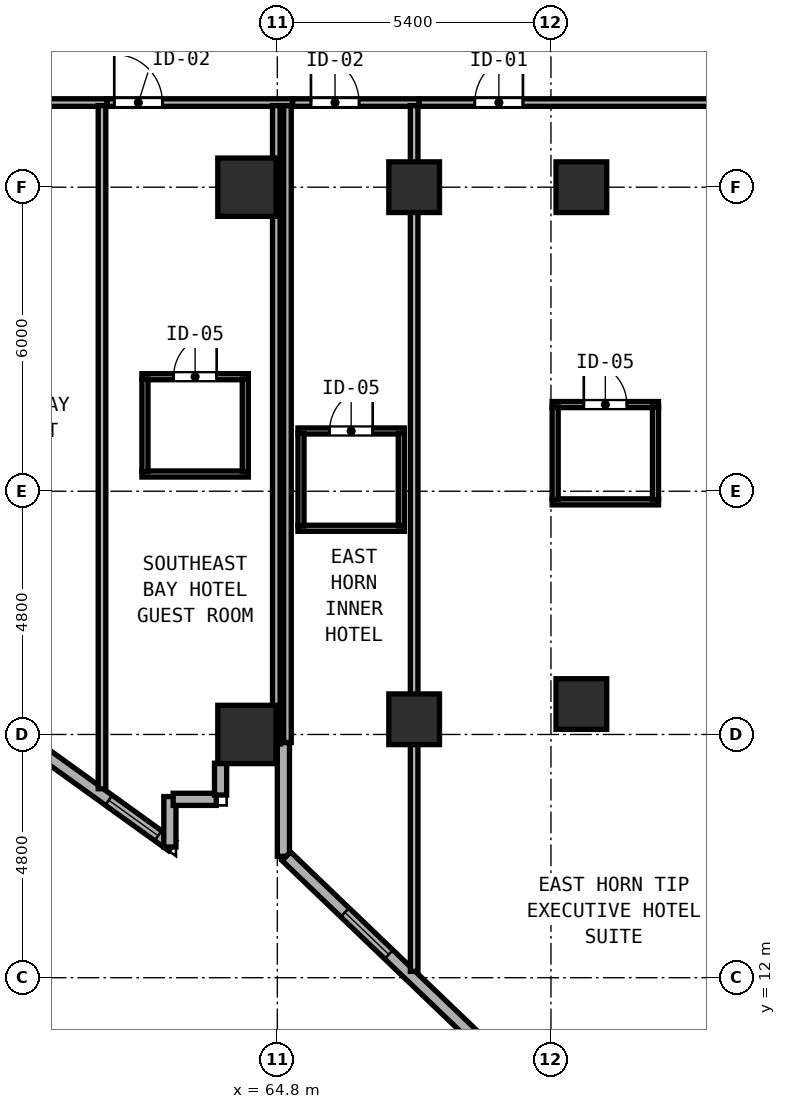
"""IFC4 building model, lengths in metres.
Left out: names, types, materials, properties, quantities, classifications, styles, units other than length and angle.
Written with IfcOpenShell. Run it as: python <this file> out.ifc"""

import sys

from ifc_helpers import new_model, si_unit, direction, frame, frame_2d, origin, origin_2d, place, context, subcontext, project, spatial, rectangle, hollow_rectangle, extrude, element, fill, save


model = new_model("IFC4")
c1 = context("Model", 3, precision=1e-05, world=origin(), true_north=direction((0.0, 1.0)))
c2 = subcontext(c1, "Body", "Model", "MODEL_VIEW")
j1 = project(units=[si_unit("LENGTHUNIT", "METRE"), si_unit("PLANEANGLEUNIT", "RADIAN")], contexts=[c1])
p1 = place(None, origin())
s1 = spatial("IfcSite", under=j1, at=p1, CompositionType="ELEMENT")
p2 = place(p1, origin())
s2 = spatial("IfcBuilding", under=s1, at=p2, CompositionType="ELEMENT")
p3 = place(p2, frame((0.0, 0.0, 55.2)))
s3 = spatial("IfcBuildingStorey", under=s2, at=p3, CompositionType="ELEMENT", Elevation=55.2)
for number, where, z_axis, x_axis in (
    (1, (64.2, 16.8, 0.0), (0.0, 0.0, 1.0), (1.0, 0.0, 0.0)),
    (2, (64.2, 27.6, 0.0), (0.0, 0.0, 1.0), (1.0, 0.0, 0.0)),
):
    element("IfcColumn", number, at=place(p3, frame(where, z_axis=z_axis, x_axis=x_axis)), inside=s3, PredefinedType="COLUMN", context=c2, shape_type="SweptSolid", body=[
        extrude(hollow_rectangle(XDim=1.15, YDim=1.15, WallThickness=0.042, at=origin_2d()), origin(), (0.0, 0.0, 1.0), 3.8),
    ])
for number, where, z_axis, x_axis in (
    (3, (70.8, 17.4, 0.0), (0.0, 0.0, 1.0), (1.0, 0.0, 0.0)),
    (4, (70.8, 27.6, 0.0), (0.0, 0.0, 1.0), (1.0, 0.0, 0.0)),
    (5, (67.5, 17.1, 0.0), (0.0, 0.0, 1.0), (1.0, 0.0, 0.0)),
    (6, (67.5, 27.6, 0.0), (0.0, 0.0, 1.0), (1.0, 0.0, 0.0)),
):
    element("IfcColumn", number, at=place(p3, frame(where, z_axis=z_axis, x_axis=x_axis)), inside=s3, PredefinedType="COLUMN", context=c2, shape_type="SweptSolid", body=[
        extrude(hollow_rectangle(XDim=1.0, YDim=1.0, WallThickness=0.038, at=origin_2d()), origin(), (0.0, 0.0, 1.0), 3.8),
    ])
p4 = place(p3, frame((53.367, 21.34, 0.0), z_axis=(0.0, 0.0, 1.0), x_axis=(0.811543176492, -0.58429245476, 0.0)))
e7 = element("IfcWall", 7, at=p4, inside=s3, PredefinedType="SOLIDWALL", context=c2, shape_type="SweptSolid", body=[
    extrude(rectangle(XDim=11.531, YDim=0.24, at=frame_2d((5.765, 0.0))), origin(), (0.0, 0.0, 1.0), 3.097),
])
p5 = place(p4, frame((1.6, 0.0, 0.85)))
e8 = element("IfcOpeningElement", 8, at=p5, cuts=e7, PredefinedType="OPENING", context=c2, shape_type="SweptSolid", body=[
    extrude(rectangle(XDim=1.2, YDim=1.85, at=frame_2d((0.6, 0.925))), frame((0.0, 0.13, 0.0), z_axis=(0.0, -1.0, 0.0), x_axis=(1.0, 0.0, 0.0)), (0.0, 0.0, 1.0), 0.26),
])
p6 = place(p4, frame((7.0, 0.0, 0.85)))
e9 = element("IfcOpeningElement", 9, at=p6, cuts=e7, PredefinedType="OPENING", context=c2, shape_type="SweptSolid", body=[
    extrude(rectangle(XDim=1.2, YDim=1.85, at=frame_2d((0.6, 0.925))), frame((0.0, 0.13, 0.0), z_axis=(0.0, -1.0, 0.0), x_axis=(1.0, 0.0, 0.0)), (0.0, 0.0, 1.0), 0.26),
])
p7 = place(p4, frame((9.99, 0.0, 0.85)))
e10 = element("IfcOpeningElement", 10, at=p7, cuts=e7, PredefinedType="OPENING", context=c2, shape_type="SweptSolid", body=[
    extrude(rectangle(XDim=1.2, YDim=1.85, at=frame_2d((0.6, 0.925))), frame((0.0, 0.13, 0.0), z_axis=(0.0, -1.0, 0.0), x_axis=(1.0, 0.0, 0.0)), (0.0, 0.0, 1.0), 0.26),
])
p8 = place(p3, frame((62.68, 14.579, 0.0), z_axis=(0.0, 0.0, 1.0), x_axis=(0.0, 1.0, 0.0)))
e11 = element("IfcWall", 11, at=p8, inside=s3, PredefinedType="SOLIDWALL", context=c2, shape_type="SweptSolid", body=[
    extrude(rectangle(XDim=0.996, YDim=0.24, at=frame_2d((0.498, 0.0))), origin(), (0.0, 0.0, 1.0), 3.6),
])
p9 = place(p3, frame((62.745, 15.52, 0.0), z_axis=(0.0, 0.0, 1.0), x_axis=(1.0, 0.0, 0.0)))
e12 = element("IfcWall", 12, at=p9, inside=s3, PredefinedType="SOLIDWALL", context=c2, shape_type="SweptSolid", body=[
    extrude(rectangle(XDim=0.85, YDim=0.24, at=frame_2d((0.425, 0.0))), origin(), (0.0, 0.0, 1.0), 3.6),
])
p10 = place(p3, frame((63.68, 15.605, 0.0), z_axis=(0.0, 0.0, 1.0), x_axis=(0.0, 1.0, 0.0)))
e13 = element("IfcWall", 13, at=p10, inside=s3, PredefinedType="SOLIDWALL", context=c2, shape_type="SweptSolid", body=[
    extrude(rectangle(XDim=0.628, YDim=0.24, at=frame_2d((0.314, 0.0))), origin(), (0.0, 0.0, 1.0), 3.6),
])
p11 = place(p3, frame((64.92, 16.64, 0.0), z_axis=(0.0, 0.0, 1.0), x_axis=(0.0, -1.0, 0.0)))
e14 = element("IfcWall", 14, at=p11, inside=s3, PredefinedType="SOLIDWALL", context=c2, shape_type="SweptSolid", body=[
    extrude(rectangle(XDim=2.244, YDim=0.24, at=frame_2d((1.122, 0.0))), origin(), (0.0, 0.0, 1.0), 3.6),
])
p12 = place(p3, frame((64.978, 14.396, 0.0), z_axis=(0.0, 0.0, 1.0), x_axis=(0.722045918727, -0.691845135308, 0.0)))
e15 = element("IfcWall", 15, at=p12, inside=s3, PredefinedType="SOLIDWALL", context=c2, shape_type="SweptSolid", body=[
    extrude(rectangle(XDim=11.358, YDim=0.24, at=frame_2d((5.679, 0.0))), origin(), (0.0, 0.0, 1.0), 3.6),
])
p13 = place(p12, frame((1.6, 0.0, 0.85)))
e16 = element("IfcOpeningElement", 16, at=p13, cuts=e15, PredefinedType="OPENING", context=c2, shape_type="SweptSolid", body=[
    extrude(rectangle(XDim=1.2, YDim=1.85, at=frame_2d((0.6, 0.925))), frame((0.0, 0.13, 0.0), z_axis=(0.0, -1.0, 0.0), x_axis=(1.0, 0.0, 0.0)), (0.0, 0.0, 1.0), 0.26),
])
p14 = place(p12, frame((7.0, 0.0, 0.85)))
e17 = element("IfcOpeningElement", 17, at=p14, cuts=e15, PredefinedType="OPENING", context=c2, shape_type="SweptSolid", body=[
    extrude(rectangle(XDim=1.2, YDim=1.85, at=frame_2d((0.6, 0.925))), frame((0.0, 0.13, 0.0), z_axis=(0.0, -1.0, 0.0), x_axis=(1.0, 0.0, 0.0)), (0.0, 0.0, 1.0), 0.26),
])
p15 = place(p3, frame((75.077, 28.713, 0.0), z_axis=(0.0, 0.0, 1.0), x_axis=(-0.675751546976, 0.737129464042, 0.0)))
e18 = element("IfcWall", 18, at=p15, inside=s3, PredefinedType="SOLIDWALL", context=c2, shape_type="SweptSolid", body=[
    extrude(rectangle(XDim=3.286, YDim=0.24, at=frame_2d((1.643, 0.0))), origin(), (0.0, 0.0, 1.0), 3.6),
])
p16 = place(p3, frame((57.172, 29.27, 0.0), z_axis=(0.0, 0.0, 1.0), x_axis=(1.0, 0.0, 0.0)))
e19 = element("IfcWall", 19, at=p16, inside=s3, PredefinedType="PARTITIONING", context=c2, shape_type="SweptSolid", body=[
    extrude(rectangle(XDim=4.268, YDim=0.15, at=frame_2d((2.134, 0.0))), origin(), (0.0, 0.0, 1.0), 3.6),
])
p17 = place(p16, frame((2.959, 0.0, 0.0), z_axis=(0.0, 0.0, 1.0), x_axis=(-1.0, 0.0, 0.0)))
e20 = element("IfcOpeningElement", 20, at=p17, cuts=e19, PredefinedType="OPENING", context=c2, shape_type="SweptSolid", body=[
    extrude(rectangle(XDim=0.95, YDim=2.15, at=frame_2d((0.475, 1.075))), frame((0.0, 0.085, 0.0), z_axis=(0.0, -1.0, 0.0), x_axis=(1.0, 0.0, 0.0)), (0.0, 0.0, 1.0), 0.17),
])
p18 = place(p3, frame((61.34, 15.729, 0.0), z_axis=(0.0, 0.0, 1.0), x_axis=(0.0, 1.0, 0.0)))
e21 = element("IfcWall", 21, at=p18, inside=s3, PredefinedType="PARTITIONING", context=c2, shape_type="SweptSolid", body=[
    extrude(rectangle(XDim=13.481, YDim=0.15, at=frame_2d((6.741, 0.0))), origin(), (0.0, 0.0, 1.0), 3.6),
])
p19 = place(p3, frame((61.442, 29.27, 0.0), z_axis=(0.0, 0.0, 1.0), x_axis=(1.0, 0.0, 0.0)))
e22 = element("IfcWall", 22, at=p19, inside=s3, PredefinedType="PARTITIONING", context=c2, shape_type="SweptSolid", body=[
    extrude(rectangle(XDim=3.658, YDim=0.15, at=frame_2d((1.829, 0.0))), origin(), (0.0, 0.0, 1.0), 3.6),
])
p20 = place(p19, frame((1.09, 0.0, 0.0), z_axis=(0.0, 0.0, 1.0), x_axis=(-1.0, 0.0, 0.0)))
e23 = element("IfcOpeningElement", 23, at=p20, cuts=e22, PredefinedType="OPENING", context=c2, shape_type="SweptSolid", body=[
    extrude(rectangle(XDim=0.95, YDim=2.15, at=frame_2d((0.475, 1.075))), frame((0.0, 0.085, 0.0), z_axis=(0.0, -1.0, 0.0), x_axis=(1.0, 0.0, 0.0)), (0.0, 0.0, 1.0), 0.17),
])
p21 = place(p3, frame((65.0, 16.642, 0.0), z_axis=(0.0, 0.0, 1.0), x_axis=(0.0, 1.0, 0.0)))
e24 = element("IfcWall", 24, at=p21, inside=s3, PredefinedType="PARTITIONING", context=c2, shape_type="SweptSolid", body=[
    extrude(rectangle(XDim=12.568, YDim=0.15, at=frame_2d((6.284, 0.0))), origin(), (0.0, 0.0, 1.0), 3.6),
])
p22 = place(p3, frame((62.128, 23.86, 0.0), z_axis=(0.0, 0.0, 1.0), x_axis=(1.0, 0.0, 0.0)))
e25 = element("IfcWall", 25, at=p22, inside=s3, PredefinedType="PARTITIONING", context=c2, shape_type="SweptSolid", body=[
    extrude(rectangle(XDim=2.1, YDim=0.12, at=frame_2d((1.05, 0.0))), origin(), (0.0, 0.0, 1.0), 3.6),
])
p23 = place(p22, frame((1.475, 0.0, 0.0), z_axis=(0.0, 0.0, 1.0), x_axis=(-1.0, 0.0, 0.0)))
e26 = element("IfcOpeningElement", 26, at=p23, cuts=e25, PredefinedType="OPENING", context=c2, shape_type="SweptSolid", body=[
    extrude(rectangle(XDim=0.85, YDim=2.1, at=frame_2d((0.425, 1.05))), frame((0.0, 0.07, 0.0), z_axis=(0.0, -1.0, 0.0), x_axis=(1.0, 0.0, 0.0)), (0.0, 0.0, 1.0), 0.14),
])
p24 = place(p3, frame((62.128, 21.94, 0.0), z_axis=(0.0, 0.0, 1.0), x_axis=(1.0, 0.0, 0.0)))
e27 = element("IfcWall", 27, at=p24, inside=s3, PredefinedType="PARTITIONING", context=c2, shape_type="SweptSolid", body=[
    extrude(rectangle(XDim=2.1, YDim=0.12, at=frame_2d((1.05, 0.0))), origin(), (0.0, 0.0, 1.0), 3.6),
])
p25 = place(p3, frame((62.188, 21.985, 0.0), z_axis=(0.0, 0.0, 1.0), x_axis=(0.0, 1.0, 0.0)))
e28 = element("IfcWall", 28, at=p25, inside=s3, PredefinedType="PARTITIONING", context=c2, shape_type="SweptSolid", body=[
    extrude(rectangle(XDim=1.83, YDim=0.12, at=frame_2d((0.915, 0.0))), origin(), (0.0, 0.0, 1.0), 3.6),
])
p26 = place(p3, frame((64.168, 21.985, 0.0), z_axis=(0.0, 0.0, 1.0), x_axis=(0.0, 1.0, 0.0)))
e29 = element("IfcWall", 29, at=p26, inside=s3, PredefinedType="PARTITIONING", context=c2, shape_type="SweptSolid", body=[
    extrude(rectangle(XDim=1.83, YDim=0.12, at=frame_2d((0.915, 0.0))), origin(), (0.0, 0.0, 1.0), 3.097),
])
p27 = place(p3, frame((65.102, 29.27, 0.0), z_axis=(0.0, 0.0, 1.0), x_axis=(1.0, 0.0, 0.0)))
e30 = element("IfcWall", 30, at=p27, inside=s3, PredefinedType="PARTITIONING", context=c2, shape_type="SweptSolid", body=[
    extrude(rectangle(XDim=2.498, YDim=0.15, at=frame_2d((1.249, 0.0))), origin(), (0.0, 0.0, 1.0), 3.6),
])
p28 = place(p27, frame((1.312, 0.0, 0.0), z_axis=(0.0, 0.0, 1.0), x_axis=(-1.0, 0.0, 0.0)))
e31 = element("IfcOpeningElement", 31, at=p28, cuts=e30, PredefinedType="OPENING", context=c2, shape_type="SweptSolid", body=[
    extrude(rectangle(XDim=0.95, YDim=2.15, at=frame_2d((0.475, 1.075))), frame((0.0, 0.085, 0.0), z_axis=(0.0, -1.0, 0.0), x_axis=(1.0, 0.0, 0.0)), (0.0, 0.0, 1.0), 0.17),
])
p29 = place(p3, frame((67.5, 12.125, 0.0), z_axis=(0.0, 0.0, 1.0), x_axis=(0.0, 1.0, 0.0)))
e32 = element("IfcWall", 32, at=p29, inside=s3, PredefinedType="PARTITIONING", context=c2, shape_type="SweptSolid", body=[
    extrude(rectangle(XDim=17.085, YDim=0.15, at=frame_2d((8.543, 0.0))), origin(), (0.0, 0.0, 1.0), 3.6),
])
p30 = place(p3, frame((64.78, 16.612, 0.0), z_axis=(0.0, 0.0, 1.0), x_axis=(0.0, 1.0, 0.0)))
e33 = element("IfcWall", 33, at=p30, inside=s3, PredefinedType="PARTITIONING", context=c2, shape_type="SweptSolid", body=[
    extrude(rectangle(XDim=12.598, YDim=0.15, at=frame_2d((6.299, 0.0))), origin(), (0.0, 0.0, 1.0), 3.6),
])
p31 = place(p3, frame((65.207, 22.789, 0.0), z_axis=(0.0, 0.0, 1.0), x_axis=(1.0, 0.0, 0.0)))
e34 = element("IfcWall", 34, at=p31, inside=s3, PredefinedType="PARTITIONING", context=c2, shape_type="SweptSolid", body=[
    extrude(rectangle(XDim=2.1, YDim=0.12, at=frame_2d((1.05, 0.0))), origin(), (0.0, 0.0, 1.0), 3.6),
])
p32 = place(p31, frame((1.475, 0.0, 0.0), z_axis=(0.0, 0.0, 1.0), x_axis=(-1.0, 0.0, 0.0)))
e35 = element("IfcOpeningElement", 35, at=p32, cuts=e34, PredefinedType="OPENING", context=c2, shape_type="SweptSolid", body=[
    extrude(rectangle(XDim=0.85, YDim=2.1, at=frame_2d((0.425, 1.05))), frame((0.0, 0.07, 0.0), z_axis=(0.0, -1.0, 0.0), x_axis=(1.0, 0.0, 0.0)), (0.0, 0.0, 1.0), 0.14),
])
p33 = place(p3, frame((65.207, 20.869, 0.0), z_axis=(0.0, 0.0, 1.0), x_axis=(1.0, 0.0, 0.0)))
e36 = element("IfcWall", 36, at=p33, inside=s3, PredefinedType="PARTITIONING", context=c2, shape_type="SweptSolid", body=[
    extrude(rectangle(XDim=2.1, YDim=0.12, at=frame_2d((1.05, 0.0))), origin(), (0.0, 0.0, 1.0), 3.6),
])
for number, where, z_axis, x_axis in (
    (37, (65.267, 20.914, 0.0), (0.0, 0.0, 1.0), (0.0, 1.0, 0.0)),
    (38, (67.247, 20.914, 0.0), (0.0, 0.0, 1.0), (0.0, 1.0, 0.0)),
):
    element("IfcWall", number, at=place(p3, frame(where, z_axis=z_axis, x_axis=x_axis)), inside=s3, PredefinedType="PARTITIONING", context=c2, shape_type="SweptSolid", body=[
        extrude(rectangle(XDim=1.83, YDim=0.12, at=frame_2d((0.915, 0.0))), origin(), (0.0, 0.0, 1.0), 3.6),
    ])
p34 = place(p3, frame((67.602, 29.27, 0.0), z_axis=(0.0, 0.0, 1.0), x_axis=(1.0, 0.0, 0.0)))
e39 = element("IfcWall", 39, at=p34, inside=s3, PredefinedType="PARTITIONING", context=c2, shape_type="SweptSolid", body=[
    extrude(rectangle(XDim=6.822, YDim=0.15, at=frame_2d((3.411, 0.0))), origin(), (0.0, 0.0, 1.0), 3.6),
])
p35 = place(p34, frame((2.045, 0.0, 0.0), z_axis=(0.0, 0.0, 1.0), x_axis=(-1.0, 0.0, 0.0)))
e40 = element("IfcOpeningElement", 40, at=p35, cuts=e39, PredefinedType="OPENING", context=c2, shape_type="SweptSolid", body=[
    extrude(rectangle(XDim=0.95, YDim=2.18, at=frame_2d((0.475, 1.09))), frame((0.0, 0.085, 0.0), z_axis=(0.0, -1.0, 0.0), x_axis=(1.0, 0.0, 0.0)), (0.0, 0.0, 1.0), 0.17),
])
p36 = place(p3, frame((70.223, 23.31, 0.0), z_axis=(0.0, 0.0, 1.0), x_axis=(1.0, 0.0, 0.0)))
e41 = element("IfcWall", 41, at=p36, inside=s3, PredefinedType="PARTITIONING", context=c2, shape_type="SweptSolid", body=[
    extrude(rectangle(XDim=2.1, YDim=0.12, at=frame_2d((1.05, 0.0))), origin(), (0.0, 0.0, 1.0), 3.6),
])
p37 = place(p36, frame((1.475, 0.0, 0.0), z_axis=(0.0, 0.0, 1.0), x_axis=(-1.0, 0.0, 0.0)))
e42 = element("IfcOpeningElement", 42, at=p37, cuts=e41, PredefinedType="OPENING", context=c2, shape_type="SweptSolid", body=[
    extrude(rectangle(XDim=0.85, YDim=2.1, at=frame_2d((0.425, 1.05))), frame((0.0, 0.07, 0.0), z_axis=(0.0, -1.0, 0.0), x_axis=(1.0, 0.0, 0.0)), (0.0, 0.0, 1.0), 0.14),
])
p38 = place(p3, frame((70.223, 21.39, 0.0), z_axis=(0.0, 0.0, 1.0), x_axis=(1.0, 0.0, 0.0)))
e43 = element("IfcWall", 43, at=p38, inside=s3, PredefinedType="PARTITIONING", context=c2, shape_type="SweptSolid", body=[
    extrude(rectangle(XDim=2.1, YDim=0.12, at=frame_2d((1.05, 0.0))), origin(), (0.0, 0.0, 1.0), 3.6),
])
for number, where, z_axis, x_axis in (
    (44, (70.283, 21.435, 0.0), (0.0, 0.0, 1.0), (0.0, 1.0, 0.0)),
    (45, (72.263, 21.435, 0.0), (0.0, 0.0, 1.0), (0.0, 1.0, 0.0)),
):
    element("IfcWall", number, at=place(p3, frame(where, z_axis=z_axis, x_axis=x_axis)), inside=s3, PredefinedType="PARTITIONING", context=c2, shape_type="SweptSolid", body=[
        extrude(rectangle(XDim=1.83, YDim=0.12, at=frame_2d((0.915, 0.0))), origin(), (0.0, 0.0, 1.0), 3.6),
    ])
p39 = place(p13, origin())
e46 = element("IfcWindow", 46, at=p39, inside=s3, PartitioningType="SINGLE_PANEL", PredefinedType="WINDOW", context=c2, shape_type="SweptSolid", body=[
    extrude(rectangle(XDim=1.2, YDim=1.85, at=frame_2d((0.6, 0.925))), frame((0.0, 0.03, 0.0), z_axis=(0.0, -1.0, 0.0), x_axis=(1.0, 0.0, 0.0)), (0.0, 0.0, 1.0), 0.06),
])
fill(e16, e46)
p40 = place(p20, origin())
e47 = element("IfcDoor", 47, at=p40, inside=s3, OperationType="SINGLE_SWING_RIGHT", PredefinedType="DOOR", context=c2, shape_type="SweptSolid", body=[
    extrude(rectangle(XDim=0.95, YDim=2.15, at=frame_2d((0.475, 1.075))), frame((0.0, 0.025, 0.0), z_axis=(0.0, -1.0, 0.0), x_axis=(1.0, 0.0, 0.0)), (0.0, 0.0, 1.0), 0.05),
])
fill(e23, e47)
p41 = place(p23, origin())
e48 = element("IfcDoor", 48, at=p41, inside=s3, OperationType="SINGLE_SWING_LEFT", PredefinedType="DOOR", context=c2, shape_type="SweptSolid", body=[
    extrude(rectangle(XDim=0.85, YDim=2.1, at=frame_2d((0.425, 1.05))), frame((0.0, 0.025, 0.0), z_axis=(0.0, -1.0, 0.0), x_axis=(1.0, 0.0, 0.0)), (0.0, 0.0, 1.0), 0.05),
])
fill(e26, e48)
p42 = place(p28, origin())
e49 = element("IfcDoor", 49, at=p42, inside=s3, OperationType="SINGLE_SWING_RIGHT", PredefinedType="DOOR", context=c2, shape_type="SweptSolid", body=[
    extrude(rectangle(XDim=0.95, YDim=2.15, at=frame_2d((0.475, 1.075))), frame((0.0, 0.025, 0.0), z_axis=(0.0, -1.0, 0.0), x_axis=(1.0, 0.0, 0.0)), (0.0, 0.0, 1.0), 0.05),
])
fill(e31, e49)
p43 = place(p32, origin())
e50 = element("IfcDoor", 50, at=p43, inside=s3, OperationType="SINGLE_SWING_LEFT", PredefinedType="DOOR", context=c2, shape_type="SweptSolid", body=[
    extrude(rectangle(XDim=0.85, YDim=2.1, at=frame_2d((0.425, 1.05))), frame((0.0, 0.025, 0.0), z_axis=(0.0, -1.0, 0.0), x_axis=(1.0, 0.0, 0.0)), (0.0, 0.0, 1.0), 0.05),
])
fill(e35, e50)
p44 = place(p35, origin())
e51 = element("IfcDoor", 51, at=p44, inside=s3, OperationType="SINGLE_SWING_LEFT", PredefinedType="DOOR", context=c2, shape_type="SweptSolid", body=[
    extrude(rectangle(XDim=0.95, YDim=2.18, at=frame_2d((0.475, 1.09))), frame((0.0, 0.025, 0.0), z_axis=(0.0, -1.0, 0.0), x_axis=(1.0, 0.0, 0.0)), (0.0, 0.0, 1.0), 0.05),
])
fill(e40, e51)
p45 = place(p37, origin())
e52 = element("IfcDoor", 52, at=p45, inside=s3, OperationType="SINGLE_SWING_RIGHT", PredefinedType="DOOR", context=c2, shape_type="SweptSolid", body=[
    extrude(rectangle(XDim=0.85, YDim=2.1, at=frame_2d((0.425, 1.05))), frame((0.0, 0.025, 0.0), z_axis=(0.0, -1.0, 0.0), x_axis=(1.0, 0.0, 0.0)), (0.0, 0.0, 1.0), 0.05),
])
fill(e42, e52)
p46 = place(p7, origin())
e53 = element("IfcWindow", 53, at=p46, inside=s3, PartitioningType="SINGLE_PANEL", PredefinedType="WINDOW", context=c2, shape_type="SweptSolid", body=[
    extrude(rectangle(XDim=1.2, YDim=1.85, at=frame_2d((0.6, 0.925))), frame((0.0, 0.03, 0.0), z_axis=(0.0, -1.0, 0.0), x_axis=(1.0, 0.0, 0.0)), (0.0, 0.0, 1.0), 0.06),
])
fill(e10, e53)
save(model, sys.argv[1])
